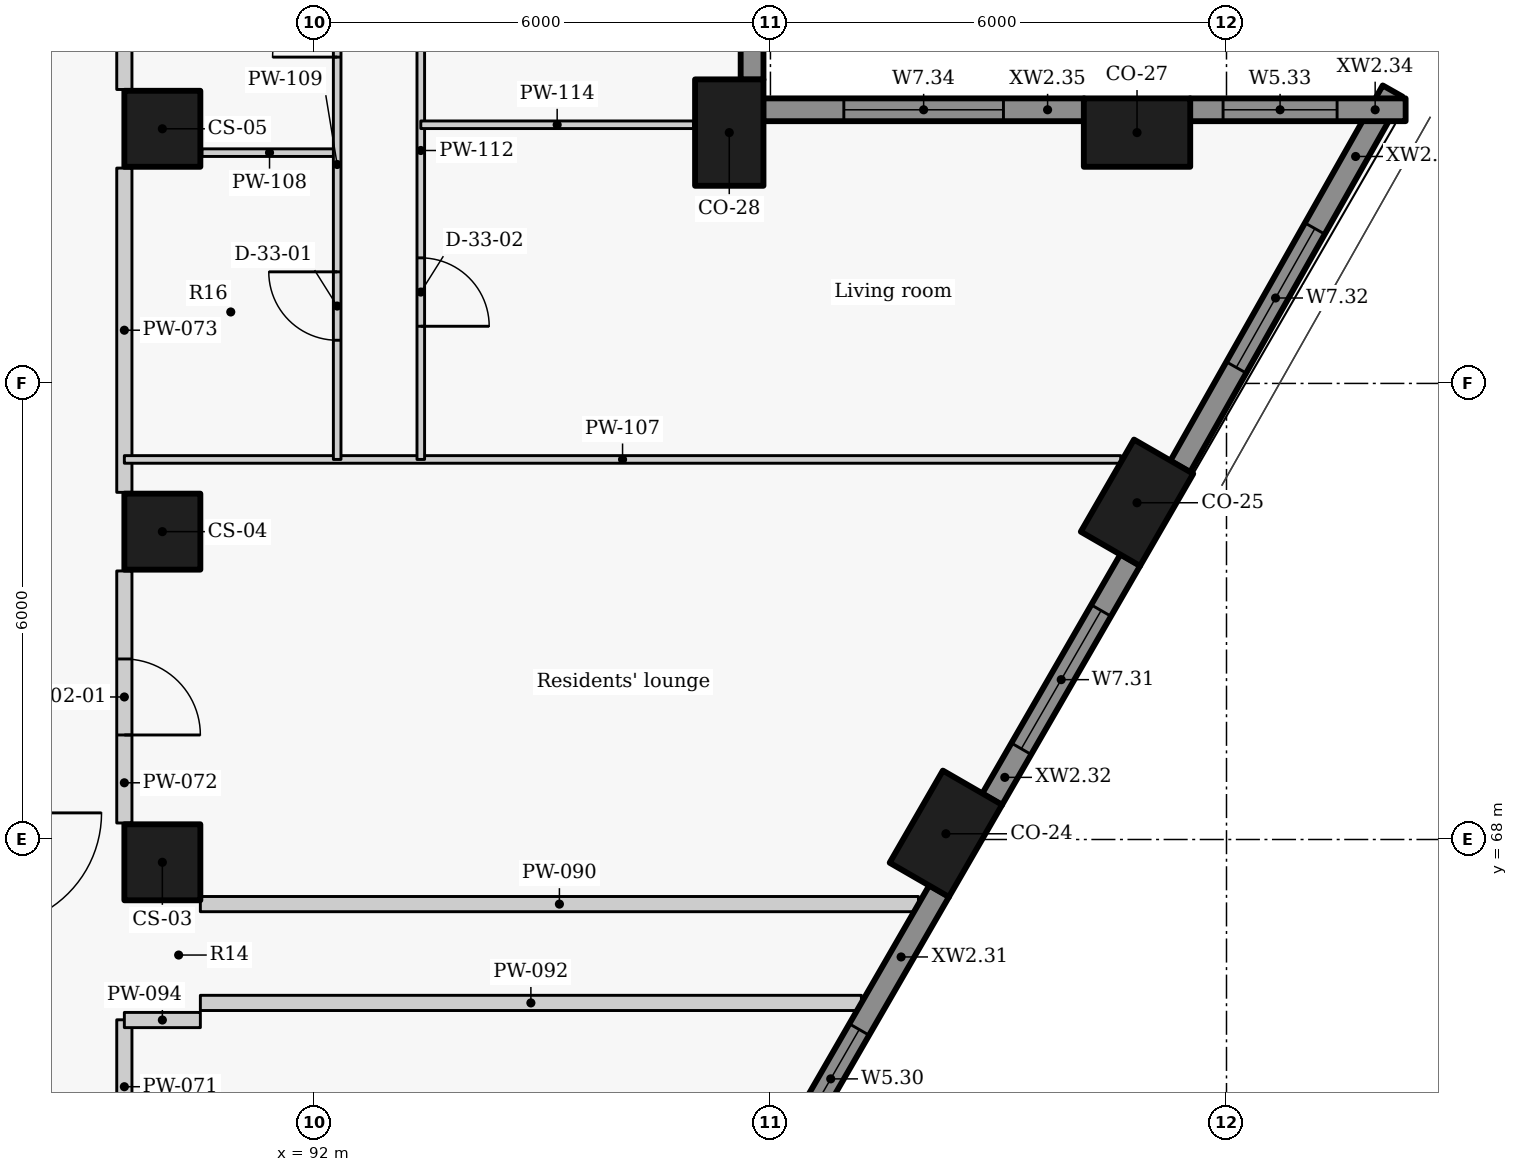
"""IFC4 building model, lengths in metres.
Left out: names, types, materials, properties, quantities, classifications, styles, units other than length and angle.
Written with IfcOpenShell. Run it as: python <this file> out.ifc"""

import sys

from ifc_helpers import new_model, si_unit, direction, frame, frame_2d, origin, origin_2d, place, context, subcontext, project, spatial, rectangle, extrude, element, fill, save


model = new_model("IFC4")
c1 = context("Model", 3, precision=1e-05, world=origin(), true_north=direction((0.0, 1.0)))
c2 = subcontext(c1, "Body", "Model", "MODEL_VIEW")
j1 = project(units=[si_unit("LENGTHUNIT", "METRE"), si_unit("PLANEANGLEUNIT", "RADIAN")], contexts=[c1])
p1 = place(None, origin())
s1 = spatial("IfcSite", under=j1, at=p1, CompositionType="ELEMENT")
p2 = place(p1, origin())
s2 = spatial("IfcBuilding", under=s1, at=p2, CompositionType="ELEMENT")
p3 = place(p2, frame((0.0, 0.0, 81.0)))
s3 = spatial("IfcBuildingStorey", under=s2, at=p3, CompositionType="ELEMENT", Elevation=81.0)
for number, where, z_axis, x_axis in (
    (1, (100.308, 68.075, 0.0), (0.0, 0.0, 1.0), (0.5, 0.866, 0.0)),
    (2, (102.823, 72.43, 0.0), (0.0, 0.0, 1.0), (0.5, 0.866, 0.0)),
    (3, (102.823, 77.3, 0.0), (0.0, 0.0, 1.0), (-1.0, 0.0, 0.0)),
    (4, (97.458, 77.3, 0.0), (0.0, 0.0, 1.0), (0.0, 1.0, 0.0)),
):
    element("IfcColumn", number, at=place(p3, frame(where, z_axis=z_axis, x_axis=x_axis)), inside=s3, PredefinedType="COLUMN", context=c2, shape_type="SweptSolid", body=[
        extrude(rectangle(XDim=1.4, YDim=0.9, at=origin_2d()), origin(), (0.0, 0.0, 1.0), 3.3),
    ])
for number, where, z_axis, x_axis in (
    (5, (90.0, 67.7, 0.0), (0.0, 0.0, 1.0), (0.0, 1.0, 0.0)),
    (6, (90.0, 72.05, 0.0), (0.0, 0.0, 1.0), (0.0, 1.0, 0.0)),
    (7, (90.0, 77.35, 0.0), (0.0, 0.0, 1.0), (0.0, 1.0, 0.0)),
):
    element("IfcColumn", number, at=place(p3, frame(where, z_axis=z_axis, x_axis=x_axis)), inside=s3, PredefinedType="COLUMN", context=c2, shape_type="SweptSolid", body=[
        extrude(rectangle(XDim=1.0, YDim=1.0, at=origin_2d()), origin(), (0.0, 0.0, 1.0), 3.3),
    ])
p4 = place(p3, frame((98.253, 63.916, 0.0), z_axis=(0.0, 0.0, 1.0), x_axis=(0.499957037901, 0.866050206543, 0.0)))
e8 = element("IfcWall", 8, at=p4, inside=s3, PredefinedType="SOLIDWALL", context=c2, shape_type="SweptSolid", body=[
    extrude(rectangle(XDim=3.934, YDim=0.3, at=frame_2d((1.967, 0.0))), origin(), (0.0, 0.0, 1.0), 2.425),
])
p5 = place(p4, frame((0.33, 0.0, 0.9)))
e9 = element("IfcOpeningElement", 9, at=p5, cuts=e8, PredefinedType="OPENING", context=c2, shape_type="SweptSolid", body=[
    extrude(rectangle(XDim=1.5, YDim=1.1, at=frame_2d((0.75, 0.55))), frame((0.0, 0.16, 0.0), z_axis=(0.0, -1.0, 0.0), x_axis=(1.0, 0.0, 0.0)), (0.0, 0.0, 1.0), 0.32),
])
p6 = place(p3, frame((100.916, 68.528, 0.0), z_axis=(0.0, 0.0, 1.0), x_axis=(0.500009139881, 0.866020126807, 0.0)))
e10 = element("IfcWall", 10, at=p6, inside=s3, PredefinedType="SOLIDWALL", context=c2, shape_type="SweptSolid", body=[
    extrude(rectangle(XDim=3.637, YDim=0.3, at=frame_2d((1.818, 0.0))), origin(), (0.0, 0.0, 1.0), 2.425),
])
p7 = place(p6, frame((0.768, 0.0, 0.9)))
e11 = element("IfcOpeningElement", 11, at=p7, cuts=e10, PredefinedType="OPENING", context=c2, shape_type="SweptSolid", body=[
    extrude(rectangle(XDim=2.1, YDim=1.1, at=frame_2d((1.05, 0.55))), frame((0.0, 0.16, 0.0), z_axis=(0.0, -1.0, 0.0), x_axis=(1.0, 0.0, 0.0)), (0.0, 0.0, 1.0), 0.32),
])
p8 = place(p3, frame((103.391, 72.906, 0.0), z_axis=(0.0, 0.0, 1.0), x_axis=(0.492456858874, 0.870336855561, 0.0)))
e12 = element("IfcWall", 12, at=p8, inside=s3, PredefinedType="SOLIDWALL", context=c2, shape_type="SweptSolid", body=[
    extrude(rectangle(XDim=5.677, YDim=0.3, at=frame_2d((2.838, 0.0))), origin(), (0.0, 0.0, 1.0), 2.425),
])
p9 = place(p8, frame((1.498, 0.0, 0.9)))
e13 = element("IfcOpeningElement", 13, at=p9, cuts=e12, PredefinedType="OPENING", context=c2, shape_type="SweptSolid", body=[
    extrude(rectangle(XDim=2.1, YDim=1.1, at=frame_2d((1.05, 0.55))), frame((0.0, 0.16, 0.0), z_axis=(0.0, -1.0, 0.0), x_axis=(1.0, 0.0, 0.0)), (0.0, 0.0, 1.0), 0.32),
])
p10 = place(p3, frame((106.357, 77.6, 0.0), z_axis=(0.0, 0.0, 1.0), x_axis=(-1.0, 0.0, 0.0)))
e14 = element("IfcWall", 14, at=p10, inside=s3, PredefinedType="SOLIDWALL", context=c2, shape_type="SweptSolid", body=[
    extrude(rectangle(XDim=2.838, YDim=0.3, at=frame_2d((1.419, 0.0))), origin(), (0.0, 0.0, 1.0), 2.425),
])
p11 = place(p10, frame((0.902, 0.0, 0.9)))
e15 = element("IfcOpeningElement", 15, at=p11, cuts=e14, PredefinedType="OPENING", context=c2, shape_type="SweptSolid", body=[
    extrude(rectangle(XDim=1.5, YDim=1.1, at=frame_2d((0.75, 0.55))), frame((0.0, 0.16, 0.0), z_axis=(0.0, -1.0, 0.0), x_axis=(1.0, 0.0, 0.0)), (0.0, 0.0, 1.0), 0.32),
])
p12 = place(p3, frame((102.127, 77.6, 0.0), z_axis=(0.0, 0.0, 1.0), x_axis=(-1.0, 0.0, 0.0)))
e16 = element("IfcWall", 16, at=p12, inside=s3, PredefinedType="SOLIDWALL", context=c2, shape_type="SweptSolid", body=[
    extrude(rectangle(XDim=4.223, YDim=0.3, at=frame_2d((2.111, 0.0))), origin(), (0.0, 0.0, 1.0), 2.425),
])
p13 = place(p12, frame((1.061, 0.0, 0.9)))
e17 = element("IfcOpeningElement", 17, at=p13, cuts=e16, PredefinedType="OPENING", context=c2, shape_type="SweptSolid", body=[
    extrude(rectangle(XDim=2.1, YDim=1.1, at=frame_2d((1.05, 0.55))), frame((0.0, 0.16, 0.0), z_axis=(0.0, -1.0, 0.0), x_axis=(1.0, 0.0, 0.0)), (0.0, 0.0, 1.0), 0.32),
])
p14 = place(p3, frame((97.758, 77.996, 0.0), z_axis=(0.0, 0.0, 1.0), x_axis=(0.0, 1.0, 0.0)))
e18 = element("IfcWall", 18, at=p14, inside=s3, PredefinedType="SOLIDWALL", context=c2, shape_type="SweptSolid", body=[
    extrude(rectangle(XDim=4.258, YDim=0.3, at=frame_2d((2.129, 0.0))), origin(), (0.0, 0.0, 1.0), 2.425),
])
p15 = place(p14, frame((0.49, 0.0, 0.9)))
e19 = element("IfcOpeningElement", 19, at=p15, cuts=e18, PredefinedType="OPENING", context=c2, shape_type="SweptSolid", body=[
    extrude(rectangle(XDim=1.5, YDim=1.1, at=frame_2d((0.75, 0.55))), frame((0.0, 0.16, 0.0), z_axis=(0.0, -1.0, 0.0), x_axis=(1.0, 0.0, 0.0)), (0.0, 0.0, 1.0), 0.32),
])
p16 = place(p14, frame((2.895, 0.0, 0.9)))
e20 = element("IfcOpeningElement", 20, at=p16, cuts=e18, PredefinedType="OPENING", context=c2, shape_type="SweptSolid", body=[
    extrude(rectangle(XDim=0.9, YDim=1.1, at=frame_2d((0.45, 0.55))), frame((0.0, 0.16, 0.0), z_axis=(0.0, -1.0, 0.0), x_axis=(1.0, 0.0, 0.0)), (0.0, 0.0, 1.0), 0.32),
])
p17 = place(p3, frame((89.5, 63.867, 0.0), z_axis=(0.0, 0.0, 1.0), x_axis=(0.0, 1.0, 0.0)))
e21 = element("IfcWall", 21, at=p17, inside=s3, PredefinedType="PARTITIONING", context=c2, shape_type="SweptSolid", body=[
    extrude(rectangle(XDim=1.761, YDim=0.2, at=frame_2d((0.88, 0.0))), origin(), (0.0, 0.0, 1.0), 3.025),
])
p18 = place(p3, frame((89.5, 71.533, 0.0), z_axis=(0.0, 0.0, 1.0), x_axis=(0.0, -1.0, 0.0)))
e22 = element("IfcWall", 22, at=p18, inside=s3, PredefinedType="PARTITIONING", context=c2, shape_type="SweptSolid", body=[
    extrude(rectangle(XDim=3.316, YDim=0.2, at=frame_2d((1.658, 0.0))), origin(), (0.0, 0.0, 1.0), 3.025),
])
p19 = place(p18, frame((1.158, 0.0, 0.0)))
e23 = element("IfcOpeningElement", 23, at=p19, cuts=e22, PredefinedType="OPENING", context=c2, shape_type="SweptSolid", body=[
    extrude(rectangle(XDim=1.0, YDim=2.1, at=frame_2d((0.5, 1.05))), frame((0.0, 0.11, 0.0), z_axis=(0.0, -1.0, 0.0), x_axis=(1.0, 0.0, 0.0)), (0.0, 0.0, 1.0), 0.22),
])
p20 = place(p3, frame((89.5, 72.567, 0.0), z_axis=(0.0, 0.0, 1.0), x_axis=(0.0, 1.0, 0.0)))
e24 = element("IfcWall", 24, at=p20, inside=s3, PredefinedType="PARTITIONING", context=c2, shape_type="SweptSolid", body=[
    extrude(rectangle(XDim=4.266, YDim=0.2, at=frame_2d((2.133, 0.0))), origin(), (0.0, 0.0, 1.0), 3.025),
])
p21 = place(p3, frame((89.5, 82.133, 0.0), z_axis=(0.0, 0.0, 1.0), x_axis=(0.0, -1.0, 0.0)))
e25 = element("IfcWall", 25, at=p21, inside=s3, PredefinedType="PARTITIONING", context=c2, shape_type="SweptSolid", body=[
    extrude(rectangle(XDim=4.266, YDim=0.2, at=frame_2d((2.133, 0.0))), origin(), (0.0, 0.0, 1.0), 3.025),
])
p22 = place(p21, frame((0.368, 0.0, 0.0)))
e26 = element("IfcOpeningElement", 26, at=p22, cuts=e25, PredefinedType="OPENING", context=c2, shape_type="SweptSolid", body=[
    extrude(rectangle(XDim=1.0, YDim=2.1, at=frame_2d((0.5, 1.05))), frame((0.0, 0.11, 0.0), z_axis=(0.0, -1.0, 0.0), x_axis=(1.0, 0.0, 0.0)), (0.0, 0.0, 1.0), 0.22),
])
p23 = place(p3, frame((90.5, 67.15, 0.0), z_axis=(0.0, 0.0, 1.0), x_axis=(1.0, 0.0, 0.0)))
e27 = element("IfcWall", 27, at=p23, inside=s3, PredefinedType="PARTITIONING", context=c2, shape_type="SweptSolid", body=[
    extrude(rectangle(XDim=9.448, YDim=0.2, at=frame_2d((4.724, 0.0))), origin(), (0.0, 0.0, 1.0), 2.405),
])
p24 = place(p3, frame((90.5, 65.85, 0.0), z_axis=(0.0, 0.0, 1.0), x_axis=(1.0, 0.0, 0.0)))
e28 = element("IfcWall", 28, at=p24, inside=s3, PredefinedType="PARTITIONING", context=c2, shape_type="SweptSolid", body=[
    extrude(rectangle(XDim=8.697, YDim=0.2, at=frame_2d((4.349, 0.0))), origin(), (0.0, 0.0, 1.0), 2.405),
])
p25 = place(p3, frame((89.5, 65.625, 0.0), z_axis=(0.0, 0.0, 1.0), x_axis=(1.0, 0.0, 0.0)))
e29 = element("IfcWall", 29, at=p25, inside=s3, PredefinedType="PARTITIONING", context=c2, shape_type="SweptSolid", body=[
    extrude(rectangle(XDim=1.0, YDim=0.2, at=frame_2d((0.5, 0.0))), origin(), (0.0, 0.0, 1.0), 2.505),
])
p26 = place(p3, frame((89.5, 73.0, 0.0), z_axis=(0.0, 0.0, 1.0), x_axis=(1.0, 0.0, 0.0)))
e30 = element("IfcWall", 30, at=p26, inside=s3, PredefinedType="PARTITIONING", context=c2, shape_type="SweptSolid", body=[
    extrude(rectangle(XDim=13.109, YDim=0.1, at=frame_2d((6.555, 0.0))), origin(), (0.0, 0.0, 1.0), 2.505),
])
p27 = place(p3, frame((90.52, 77.036, 0.0), z_axis=(0.0, 0.0, 1.0), x_axis=(1.0, 0.0, 0.0)))
e31 = element("IfcWall", 31, at=p27, inside=s3, PredefinedType="PARTITIONING", context=c2, shape_type="SweptSolid", body=[
    extrude(rectangle(XDim=1.78, YDim=0.1, at=frame_2d((0.89, 0.0))), origin(), (0.0, 0.0, 1.0), 3.025),
])
p28 = place(p3, frame((92.3, 73.0, 0.0), z_axis=(0.0, 0.0, 1.0), x_axis=(0.0, 1.0, 0.0)))
e32 = element("IfcWall", 32, at=p28, inside=s3, PredefinedType="PARTITIONING", context=c2, shape_type="SweptSolid", body=[
    extrude(rectangle(XDim=7.4, YDim=0.1, at=frame_2d((3.7, 0.0))), origin(), (0.0, 0.0, 1.0), 3.025),
])
p29 = place(p28, frame((1.568, 0.0, 0.0)))
e33 = element("IfcOpeningElement", 33, at=p29, cuts=e32, PredefinedType="OPENING", context=c2, shape_type="SweptSolid", body=[
    extrude(rectangle(XDim=0.9, YDim=2.1, at=frame_2d((0.45, 1.05))), frame((0.0, 0.06, 0.0), z_axis=(0.0, -1.0, 0.0), x_axis=(1.0, 0.0, 0.0)), (0.0, 0.0, 1.0), 0.12),
])
p30 = place(p28, frame((5.293, 0.0, 0.0)))
e34 = element("IfcOpeningElement", 34, at=p30, cuts=e32, PredefinedType="OPENING", context=c2, shape_type="SweptSolid", body=[
    extrude(rectangle(XDim=0.85, YDim=2.1, at=frame_2d((0.425, 1.05))), frame((0.0, 0.06, 0.0), z_axis=(0.0, -1.0, 0.0), x_axis=(1.0, 0.0, 0.0)), (0.0, 0.0, 1.0), 0.12),
])
p31 = place(p3, frame((93.4, 93.55, 0.0), z_axis=(0.0, 0.0, 1.0), x_axis=(0.0, -1.0, 0.0)))
e35 = element("IfcWall", 35, at=p31, inside=s3, PredefinedType="PARTITIONING", context=c2, shape_type="SweptSolid", body=[
    extrude(rectangle(XDim=20.55, YDim=0.1, at=frame_2d((10.275, 0.0))), origin(), (0.0, 0.0, 1.0), 3.025),
])
p32 = place(p31, frame((17.898, 0.0, 0.0)))
e36 = element("IfcOpeningElement", 36, at=p32, cuts=e35, PredefinedType="OPENING", context=c2, shape_type="SweptSolid", body=[
    extrude(rectangle(XDim=0.9, YDim=2.1, at=frame_2d((0.45, 1.05))), frame((0.0, 0.06, 0.0), z_axis=(0.0, -1.0, 0.0), x_axis=(1.0, 0.0, 0.0)), (0.0, 0.0, 1.0), 0.12),
])
p33 = place(p31, frame((14.173, 0.0, 0.0)))
e37 = element("IfcOpeningElement", 37, at=p33, cuts=e35, PredefinedType="OPENING", context=c2, shape_type="SweptSolid", body=[
    extrude(rectangle(XDim=0.9, YDim=2.1, at=frame_2d((0.45, 1.05))), frame((0.0, 0.06, 0.0), z_axis=(0.0, -1.0, 0.0), x_axis=(1.0, 0.0, 0.0)), (0.0, 0.0, 1.0), 0.12),
])
p34 = place(p31, frame((11.124, 0.0, 0.0)))
e38 = element("IfcOpeningElement", 38, at=p34, cuts=e35, PredefinedType="OPENING", context=c2, shape_type="SweptSolid", body=[
    extrude(rectangle(XDim=0.9, YDim=2.1, at=frame_2d((0.45, 1.05))), frame((0.0, 0.06, 0.0), z_axis=(0.0, -1.0, 0.0), x_axis=(1.0, 0.0, 0.0)), (0.0, 0.0, 1.0), 0.12),
])
p35 = place(p31, frame((8.141, 0.0, 0.0)))
e39 = element("IfcOpeningElement", 39, at=p35, cuts=e35, PredefinedType="OPENING", context=c2, shape_type="SweptSolid", body=[
    extrude(rectangle(XDim=0.9, YDim=2.1, at=frame_2d((0.45, 1.05))), frame((0.0, 0.06, 0.0), z_axis=(0.0, -1.0, 0.0), x_axis=(1.0, 0.0, 0.0)), (0.0, 0.0, 1.0), 0.12),
])
p36 = place(p31, frame((5.223, 0.0, 0.0)))
e40 = element("IfcOpeningElement", 40, at=p36, cuts=e35, PredefinedType="OPENING", context=c2, shape_type="SweptSolid", body=[
    extrude(rectangle(XDim=0.9, YDim=2.1, at=frame_2d((0.45, 1.05))), frame((0.0, 0.06, 0.0), z_axis=(0.0, -1.0, 0.0), x_axis=(1.0, 0.0, 0.0)), (0.0, 0.0, 1.0), 0.12),
])
p37 = place(p31, frame((1.657, 0.0, 0.0)))
e41 = element("IfcOpeningElement", 41, at=p37, cuts=e35, PredefinedType="OPENING", context=c2, shape_type="SweptSolid", body=[
    extrude(rectangle(XDim=0.9, YDim=2.1, at=frame_2d((0.45, 1.05))), frame((0.0, 0.06, 0.0), z_axis=(0.0, -1.0, 0.0), x_axis=(1.0, 0.0, 0.0)), (0.0, 0.0, 1.0), 0.12),
])
p38 = place(p3, frame((93.4, 77.403, 0.0), z_axis=(0.0, 0.0, 1.0), x_axis=(1.0, 0.0, 0.0)))
e42 = element("IfcWall", 42, at=p38, inside=s3, PredefinedType="PARTITIONING", context=c2, shape_type="SweptSolid", body=[
    extrude(rectangle(XDim=3.588, YDim=0.1, at=frame_2d((1.794, 0.0))), origin(), (0.0, 0.0, 1.0), 3.025),
])
p39 = place(p5, origin())
e43 = element("IfcWindow", 43, at=p39, inside=s3, PartitioningType="SINGLE_PANEL", PredefinedType="WINDOW", context=c2, shape_type="SweptSolid", body=[
    extrude(rectangle(XDim=1.5, YDim=1.1, at=frame_2d((0.75, 0.55))), frame((0.0, 0.03, 0.0), z_axis=(0.0, -1.0, 0.0), x_axis=(1.0, 0.0, 0.0)), (0.0, 0.0, 1.0), 0.06),
])
fill(e9, e43)
p40 = place(p7, origin())
e44 = element("IfcWindow", 44, at=p40, inside=s3, PartitioningType="SINGLE_PANEL", PredefinedType="WINDOW", context=c2, shape_type="SweptSolid", body=[
    extrude(rectangle(XDim=2.1, YDim=1.1, at=frame_2d((1.05, 0.55))), frame((0.0, 0.03, 0.0), z_axis=(0.0, -1.0, 0.0), x_axis=(1.0, 0.0, 0.0)), (0.0, 0.0, 1.0), 0.06),
])
fill(e11, e44)
p41 = place(p9, origin())
e45 = element("IfcWindow", 45, at=p41, inside=s3, PartitioningType="SINGLE_PANEL", PredefinedType="WINDOW", context=c2, shape_type="SweptSolid", body=[
    extrude(rectangle(XDim=2.1, YDim=1.1, at=frame_2d((1.05, 0.55))), frame((0.0, 0.03, 0.0), z_axis=(0.0, -1.0, 0.0), x_axis=(1.0, 0.0, 0.0)), (0.0, 0.0, 1.0), 0.06),
])
fill(e13, e45)
p42 = place(p11, origin())
e46 = element("IfcWindow", 46, at=p42, inside=s3, PartitioningType="SINGLE_PANEL", PredefinedType="WINDOW", context=c2, shape_type="SweptSolid", body=[
    extrude(rectangle(XDim=1.5, YDim=1.1, at=frame_2d((0.75, 0.55))), frame((0.0, 0.03, 0.0), z_axis=(0.0, -1.0, 0.0), x_axis=(1.0, 0.0, 0.0)), (0.0, 0.0, 1.0), 0.06),
])
fill(e15, e46)
p43 = place(p13, origin())
e47 = element("IfcWindow", 47, at=p43, inside=s3, PartitioningType="SINGLE_PANEL", PredefinedType="WINDOW", context=c2, shape_type="SweptSolid", body=[
    extrude(rectangle(XDim=2.1, YDim=1.1, at=frame_2d((1.05, 0.55))), frame((0.0, 0.03, 0.0), z_axis=(0.0, -1.0, 0.0), x_axis=(1.0, 0.0, 0.0)), (0.0, 0.0, 1.0), 0.06),
])
fill(e17, e47)
p44 = place(p19, origin())
e48 = element("IfcDoor", 48, at=p44, inside=s3, OperationType="SINGLE_SWING_RIGHT", PredefinedType="DOOR", context=c2, shape_type="SweptSolid", body=[
    extrude(rectangle(XDim=1.0, YDim=2.1, at=frame_2d((0.5, 1.05))), frame((0.0, 0.025, 0.0), z_axis=(0.0, -1.0, 0.0), x_axis=(1.0, 0.0, 0.0)), (0.0, 0.0, 1.0), 0.05),
])
fill(e23, e48)
p45 = place(p29, origin())
e49 = element("IfcDoor", 49, at=p45, inside=s3, OperationType="SINGLE_SWING_RIGHT", PredefinedType="DOOR", context=c2, shape_type="SweptSolid", body=[
    extrude(rectangle(XDim=0.9, YDim=2.1, at=frame_2d((0.45, 1.05))), frame((0.0, 0.025, 0.0), z_axis=(0.0, -1.0, 0.0), x_axis=(1.0, 0.0, 0.0)), (0.0, 0.0, 1.0), 0.05),
])
fill(e33, e49)
p46 = place(p30, origin())
e50 = element("IfcDoor", 50, at=p46, inside=s3, OperationType="SINGLE_SWING_LEFT", PredefinedType="DOOR", context=c2, shape_type="SweptSolid", body=[
    extrude(rectangle(XDim=0.85, YDim=2.1, at=frame_2d((0.425, 1.05))), frame((0.0, 0.025, 0.0), z_axis=(0.0, -1.0, 0.0), x_axis=(1.0, 0.0, 0.0)), (0.0, 0.0, 1.0), 0.05),
])
fill(e34, e50)
p47 = place(p32, origin())
e51 = element("IfcDoor", 51, at=p47, inside=s3, OperationType="SINGLE_SWING_RIGHT", PredefinedType="DOOR", context=c2, shape_type="SweptSolid", body=[
    extrude(rectangle(XDim=0.9, YDim=2.1, at=frame_2d((0.45, 1.05))), frame((0.0, 0.025, 0.0), z_axis=(0.0, -1.0, 0.0), x_axis=(1.0, 0.0, 0.0)), (0.0, 0.0, 1.0), 0.05),
])
fill(e36, e51)
save(model, sys.argv[1])
